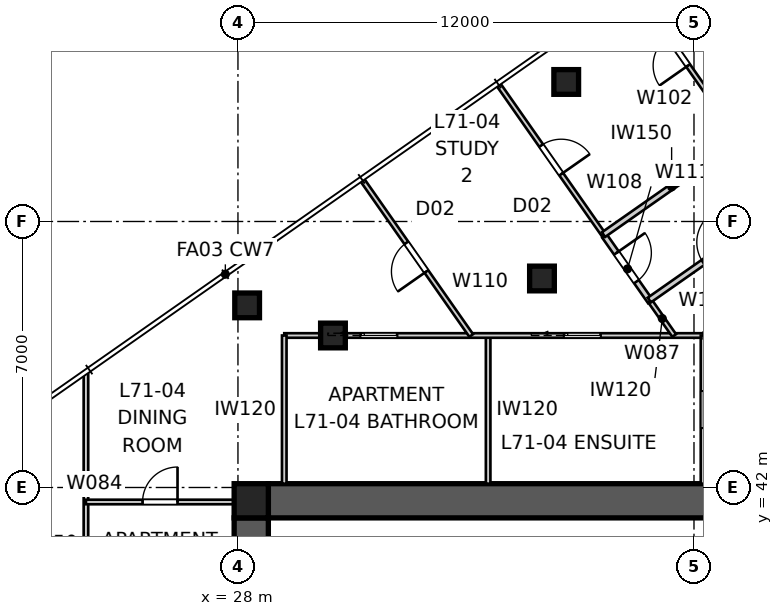
"""IFC4 building model, lengths in metres.
Left out: names, types, materials, properties, quantities, classifications, styles, units other than length and angle.
Written with IfcOpenShell. Run it as: python <this file> out.ifc"""

import sys

from ifc_helpers import new_model, si_unit, direction, frame, frame_2d, origin, origin_2d, place, context, subcontext, project, spatial, polyline, rectangle, outline, extrude, element, fill, save


model = new_model("IFC4")
c1 = context("Model", 3, precision=1e-05, world=origin(), true_north=direction((0.0, 1.0)))
c2 = subcontext(c1, "Body", "Model", "MODEL_VIEW")
j1 = project(units=[si_unit("LENGTHUNIT", "METRE"), si_unit("PLANEANGLEUNIT", "RADIAN")], contexts=[c1])
p1 = place(None, origin())
s1 = spatial("IfcSite", under=j1, at=p1, CompositionType="ELEMENT")
p2 = place(p1, origin())
s2 = spatial("IfcBuilding", under=s1, at=p2, CompositionType="ELEMENT")
p3 = place(p2, frame((0.0, 0.0, 257.4)))
s3 = spatial("IfcBuildingStorey", under=s2, at=p3, CompositionType="ELEMENT", Elevation=257.4)
p4 = place(p3, frame((28.8, 41.65, 0.0), z_axis=(0.0, 0.0, 1.0), x_axis=(1.0, 0.0, 0.0)))
e1 = element("IfcWall", 1, at=p4, inside=s3, PredefinedType="SHEAR", context=c2, shape_type="SweptSolid", body=[
    extrude(outline(polyline([(0.0, -0.45), (22.4, -0.45), (22.4, -0.025), (22.85, -0.025), (22.85, 0.025), (22.4, 0.025), (22.4, 0.45), (0.0, 0.45), (0.0, 0.025), (-0.45, 0.025), (-0.45, -0.025), (0.0, -0.025), (0.0, -0.45)])), origin(), (0.0, 0.0, 1.0), 3.4),
])
p5 = place(p3, frame((28.35, 41.2, 0.0), z_axis=(0.0, 0.0, 1.0), x_axis=(0.0, -1.0, 0.0)))
e2 = element("IfcWall", 2, at=p5, inside=s3, PredefinedType="SHEAR", context=c2, shape_type="SweptSolid", body=[
    extrude(outline(polyline([(0.0, -0.45), (22.4, -0.45), (22.4, -0.025), (22.85, -0.025), (22.85, 0.025), (22.4, 0.025), (22.4, 0.45), (0.0, 0.45), (0.0, 0.025), (-0.45, 0.025), (-0.45, -0.025), (0.0, -0.025), (0.0, -0.45)])), origin(), (0.0, 0.0, 1.0), 3.4),
])
p6 = place(p5, frame((11.14, 0.0, 0.0)))
e3 = element("IfcOpeningElement", 3, at=p6, cuts=e2, PredefinedType="OPENING", context=c2, shape_type="SweptSolid", body=[
    extrude(rectangle(XDim=1.02, YDim=2.4, at=frame_2d((0.51, 1.2))), frame((0.0, 0.46, 0.0), z_axis=(0.0, -1.0, 0.0), x_axis=(1.0, 0.0, 0.0)), (0.0, 0.0, 1.0), 0.92),
])
p7 = place(p3, frame((28.35, 41.65, 0.0), z_axis=(0.0, 0.0, 1.0), x_axis=(1.0, 0.0, 0.0)))
e4 = element("IfcColumn", 4, at=p7, inside=s3, PredefinedType="COLUMN", context=c2, shape_type="SweptSolid", body=[
    extrude(rectangle(XDim=0.9, YDim=0.9, at=origin_2d()), origin(), (0.0, 0.0, 1.0), 3.4),
])
for number, where, z_axis, x_axis in (
    (5, (36.638, 52.672, 0.0), (0.0, 0.0, 1.0), (1.0, 0.0, 0.0)),
    (6, (28.242, 46.793, 0.0), (0.0, 0.0, 1.0), (1.0, 0.0, 0.0)),
    (7, (36.0, 47.5, 0.0), (0.0, 0.0, 1.0), (1.0, 0.0, 0.0)),
    (8, (30.5, 46.0, 0.0), (0.0, 0.0, 1.0), (1.0, 0.0, 0.0)),
):
    element("IfcColumn", number, at=place(p3, frame(where, z_axis=z_axis, x_axis=x_axis)), inside=s3, PredefinedType="COLUMN", context=c2, shape_type="SweptSolid", body=[
        extrude(rectangle(XDim=0.65, YDim=0.65, at=origin_2d()), origin(), (0.0, 0.0, 1.0), 3.4),
    ])
p8 = place(p3, frame((24.0, 18.797, 0.0), z_axis=(0.0, 0.0, 1.0), x_axis=(0.0, 1.0, 0.0)))
e9 = element("IfcWall", 9, at=p8, inside=s3, PredefinedType="PARTITIONING", context=c2, shape_type="SweptSolid", body=[
    extrude(rectangle(XDim=26.198, YDim=0.12, at=frame_2d((13.099, 0.0))), origin(), (0.0, 0.0, 1.0), 2.55),
])
p9 = place(p8, frame((8.016, 0.0, 0.0)))
e10 = element("IfcOpeningElement", 10, at=p9, cuts=e9, PredefinedType="OPENING", context=c2, shape_type="SweptSolid", body=[
    extrude(rectangle(XDim=0.92, YDim=2.34, at=frame_2d((0.46, 1.17))), frame((0.0, 0.07, 0.0), z_axis=(0.0, -1.0, 0.0), x_axis=(1.0, 0.0, 0.0)), (0.0, 0.0, 1.0), 0.14),
])
p10 = place(p8, frame((16.292, 0.0, 0.0)))
e11 = element("IfcOpeningElement", 11, at=p10, cuts=e9, PredefinedType="OPENING", context=c2, shape_type="SweptSolid", body=[
    extrude(rectangle(XDim=0.92, YDim=2.34, at=frame_2d((0.46, 1.17))), frame((0.0, 0.07, 0.0), z_axis=(0.0, -1.0, 0.0), x_axis=(1.0, 0.0, 0.0)), (0.0, 0.0, 1.0), 0.14),
])
p11 = place(p3, frame((24.0, 41.619, 0.0), z_axis=(0.0, 0.0, 1.0), x_axis=(1.0, 0.0, 0.0)))
e12 = element("IfcWall", 12, at=p11, inside=s3, PredefinedType="PARTITIONING", context=c2, shape_type="SweptSolid", body=[
    extrude(rectangle(XDim=3.9, YDim=0.12, at=frame_2d((1.95, 0.0))), origin(), (0.0, 0.0, 1.0), 3.25),
])
p12 = place(p11, frame((1.49, 0.0, 0.0)))
e13 = element("IfcOpeningElement", 13, at=p12, cuts=e12, PredefinedType="OPENING", context=c2, shape_type="SweptSolid", body=[
    extrude(rectangle(XDim=0.92, YDim=2.1, at=frame_2d((0.46, 1.05))), frame((0.0, 0.07, 0.0), z_axis=(0.0, -1.0, 0.0), x_axis=(1.0, 0.0, 0.0)), (0.0, 0.0, 1.0), 0.14),
])
p13 = place(p3, frame((34.583, 46.0, 0.0), z_axis=(0.0, 0.0, 1.0), x_axis=(0.0, -1.0, 0.0)))
e14 = element("IfcWall", 14, at=p13, inside=s3, PredefinedType="PARTITIONING", context=c2, shape_type="SweptSolid", body=[
    extrude(rectangle(XDim=3.9, YDim=0.12, at=frame_2d((1.95, 0.0))), origin(), (0.0, 0.0, 1.0), 3.25),
])
p14 = place(p3, frame((29.219, 46.0, 0.0), z_axis=(0.0, 0.0, 1.0), x_axis=(1.0, 0.0, 0.0)))
e15 = element("IfcWall", 15, at=p14, inside=s3, PredefinedType="PARTITIONING", context=c2, shape_type="SweptSolid", body=[
    extrude(rectangle(XDim=11.034, YDim=0.12, at=frame_2d((5.517, 0.0))), origin(), (0.0, 0.0, 1.0), 2.55),
])
p15 = place(p14, frame((2.01, 0.0, 0.0)))
e16 = element("IfcOpeningElement", 16, at=p15, cuts=e15, PredefinedType="OPENING", context=c2, shape_type="SweptSolid", body=[
    extrude(rectangle(XDim=0.96, YDim=2.1, at=frame_2d((0.48, 1.05))), frame((0.0, 0.07, 0.0), z_axis=(0.0, -1.0, 0.0), x_axis=(1.0, 0.0, 0.0)), (0.0, 0.0, 1.0), 0.14),
])
p16 = place(p14, frame((7.363, 0.0, 0.0)))
e17 = element("IfcOpeningElement", 17, at=p16, cuts=e15, PredefinedType="OPENING", context=c2, shape_type="SweptSolid", body=[
    extrude(rectangle(XDim=0.96, YDim=2.1, at=frame_2d((0.48, 1.05))), frame((0.0, 0.07, 0.0), z_axis=(0.0, -1.0, 0.0), x_axis=(1.0, 0.0, 0.0)), (0.0, 0.0, 1.0), 0.14),
])
p17 = place(p3, frame((29.219, 42.1, 0.0), z_axis=(0.0, 0.0, 1.0), x_axis=(0.0, 1.0, 0.0)))
e18 = element("IfcWall", 18, at=p17, inside=s3, PredefinedType="PARTITIONING", context=c2, shape_type="SweptSolid", body=[
    extrude(rectangle(XDim=3.9, YDim=0.12, at=frame_2d((1.95, 0.0))), origin(), (0.0, 0.0, 1.0), 3.25),
])
p18 = place(p3, frame((40.253, 46.0, 0.0), z_axis=(0.0, 0.0, 1.0), x_axis=(0.0, -1.0, 0.0)))
e19 = element("IfcWall", 19, at=p18, inside=s3, PredefinedType="SOLIDWALL", context=c2, shape_type="SweptSolid", body=[
    extrude(rectangle(XDim=3.9, YDim=0.15, at=frame_2d((1.95, 0.0))), origin(), (0.0, 0.0, 1.0), 3.25),
])
p19 = place(p18, frame((1.47, 0.0, 0.0)))
e20 = element("IfcOpeningElement", 20, at=p19, cuts=e19, PredefinedType="OPENING", context=c2, shape_type="SweptSolid", body=[
    extrude(rectangle(XDim=0.96, YDim=2.1, at=frame_2d((0.48, 1.05))), frame((0.0, 0.085, 0.0), z_axis=(0.0, -1.0, 0.0), x_axis=(1.0, 0.0, 0.0)), (0.0, 0.0, 1.0), 0.17),
])
p20 = place(p3, frame((41.232, 51.123, 0.0), z_axis=(0.0, 0.0, 1.0), x_axis=(-0.573586984922, 0.819144657999, 0.0)))
e21 = element("IfcWall", 21, at=p20, inside=s3, PredefinedType="PARTITIONING", context=c2, shape_type="SweptSolid", body=[
    extrude(rectangle(XDim=4.864, YDim=0.12, at=frame_2d((2.432, 0.0))), origin(), (0.0, 0.0, 1.0), 3.25),
])
p21 = place(p20, frame((2.419, 0.0, 0.0)))
e22 = element("IfcOpeningElement", 22, at=p21, cuts=e21, PredefinedType="OPENING", context=c2, shape_type="SweptSolid", body=[
    extrude(rectangle(XDim=0.92, YDim=2.34, at=frame_2d((0.46, 1.17))), frame((0.0, 0.07, 0.0), z_axis=(0.0, -1.0, 0.0), x_axis=(1.0, 0.0, 0.0)), (0.0, 0.0, 1.0), 0.14),
])
p22 = place(p3, frame((34.859, 52.598, 0.0), z_axis=(0.0, 0.0, 1.0), x_axis=(0.573586984922, -0.819144657999, 0.0)))
e23 = element("IfcWall", 23, at=p22, inside=s3, PredefinedType="PARTITIONING", context=c2, shape_type="SweptSolid", body=[
    extrude(rectangle(XDim=4.864, YDim=0.12, at=frame_2d((2.432, 0.0))), origin(), (0.0, 0.0, 1.0), 3.25),
])
p23 = place(p22, frame((1.952, 0.0, 0.0)))
e24 = element("IfcOpeningElement", 24, at=p23, cuts=e23, PredefinedType="OPENING", context=c2, shape_type="SweptSolid", body=[
    extrude(rectangle(XDim=0.92, YDim=2.34, at=frame_2d((0.46, 1.17))), frame((0.0, 0.07, 0.0), z_axis=(0.0, -1.0, 0.0), x_axis=(1.0, 0.0, 0.0)), (0.0, 0.0, 1.0), 0.14),
])
p24 = place(p3, frame((38.854, 46.892, 0.0), z_axis=(0.0, 0.0, 1.0), x_axis=(0.57368792347, -0.81907396886, 0.0)))
e25 = element("IfcWall", 25, at=p24, inside=s3, PredefinedType="PARTITIONING", context=c2, shape_type="SweptSolid", body=[
    extrude(rectangle(XDim=1.089, YDim=0.12, at=frame_2d((0.545, 0.0))), origin(), (0.0, 0.0, 1.0), 3.25),
])
p25 = place(p3, frame((34.138, 46.0, 0.0), z_axis=(0.0, 0.0, 1.0), x_axis=(-0.57358708951, 0.819144584763, 0.0)))
e26 = element("IfcWall", 26, at=p25, inside=s3, PredefinedType="PARTITIONING", context=c2, shape_type="SweptSolid", body=[
    extrude(rectangle(XDim=4.991, YDim=0.12, at=frame_2d((2.496, 0.0))), origin(), (0.0, 0.0, 1.0), 3.25),
])
p26 = place(p25, frame((2.055, 0.0, 0.0)))
e27 = element("IfcOpeningElement", 27, at=p26, cuts=e26, PredefinedType="OPENING", context=c2, shape_type="SweptSolid", body=[
    extrude(rectangle(XDim=0.92, YDim=2.34, at=frame_2d((0.46, 1.17))), frame((0.0, 0.07, 0.0), z_axis=(0.0, -1.0, 0.0), x_axis=(1.0, 0.0, 0.0)), (0.0, 0.0, 1.0), 0.14),
])
p27 = place(p3, frame((37.648, 48.614, 0.0), z_axis=(0.0, 0.0, 1.0), x_axis=(0.573485736943, -0.819215545216, 0.0)))
e28 = element("IfcWall", 28, at=p27, inside=s3, PredefinedType="SOLIDWALL", context=c2, shape_type="SweptSolid", body=[
    extrude(rectangle(XDim=2.101, YDim=0.15, at=frame_2d((1.051, 0.0))), origin(), (0.0, 0.0, 1.0), 3.25),
])
p28 = place(p27, frame((0.541, 0.0, 0.0)))
e29 = element("IfcOpeningElement", 29, at=p28, cuts=e28, PredefinedType="OPENING", context=c2, shape_type="SweptSolid", body=[
    extrude(rectangle(XDim=0.92, YDim=2.34, at=frame_2d((0.46, 1.17))), frame((0.0, 0.085, 0.0), z_axis=(0.0, -1.0, 0.0), x_axis=(1.0, 0.0, 0.0)), (0.0, 0.0, 1.0), 0.17),
])
p29 = place(p3, frame((41.203, 51.164, 0.0), z_axis=(0.0, 0.0, 1.0), x_axis=(-0.81916112811, -0.573563463091, 0.0)))
e30 = element("IfcWall", 30, at=p29, inside=s3, PredefinedType="SOLIDWALL", context=c2, shape_type="SweptSolid", body=[
    extrude(rectangle(XDim=4.375, YDim=0.15, at=frame_2d((2.188, 0.0))), origin(), (0.0, 0.0, 1.0), 3.25),
])
p30 = place(p3, frame((38.825, 46.933, 0.0), z_axis=(0.0, 0.0, 1.0), x_axis=(0.81916112811, 0.573563463091, 0.0)))
e31 = element("IfcWall", 31, at=p30, inside=s3, PredefinedType="SOLIDWALL", context=c2, shape_type="SweptSolid", body=[
    extrude(rectangle(XDim=4.375, YDim=0.15, at=frame_2d((2.188, 0.0))), origin(), (0.0, 0.0, 1.0), 3.25),
])
p31 = place(p30, frame((1.728, 0.0, 0.0)))
e32 = element("IfcOpeningElement", 32, at=p31, cuts=e31, PredefinedType="OPENING", context=c2, shape_type="SweptSolid", body=[
    extrude(rectangle(XDim=0.92, YDim=2.34, at=frame_2d((0.46, 1.17))), frame((0.0, 0.085, 0.0), z_axis=(0.0, -1.0, 0.0), x_axis=(1.0, 0.0, 0.0)), (0.0, 0.0, 1.0), 0.17),
])
p32 = place(p3, frame((27.9, 41.619, 0.0), z_axis=(0.0, 0.0, 1.0), x_axis=(0.999397924003, 0.034695669724, 0.0)))
e33 = element("IfcWall", 33, at=p32, inside=s3, PredefinedType="PARTITIONING", context=c2, shape_type="SweptSolid", body=[
    extrude(rectangle(XDim=0.901, YDim=0.12, at=frame_2d((0.45, 0.0))), origin(), (0.0, 0.0, 1.0), 3.25),
])
p33 = place(p12, origin())
e34 = element("IfcDoor", 34, at=p33, inside=s3, OperationType="SINGLE_SWING_RIGHT", PredefinedType="DOOR", context=c2, shape_type="SweptSolid", body=[
    extrude(rectangle(XDim=0.92, YDim=2.1, at=frame_2d((0.46, 1.05))), frame((0.0, 0.025, 0.0), z_axis=(0.0, -1.0, 0.0), x_axis=(1.0, 0.0, 0.0)), (0.0, 0.0, 1.0), 0.05),
])
fill(e13, e34)
p34 = place(p26, origin())
e35 = element("IfcDoor", 35, at=p34, inside=s3, OperationType="SINGLE_SWING_LEFT", PredefinedType="DOOR", context=c2, shape_type="SweptSolid", body=[
    extrude(rectangle(XDim=0.92, YDim=2.34, at=frame_2d((0.46, 1.17))), frame((0.0, 0.025, 0.0), z_axis=(0.0, -1.0, 0.0), x_axis=(1.0, 0.0, 0.0)), (0.0, 0.0, 1.0), 0.05),
])
fill(e27, e35)
p35 = place(p15, origin())
e36 = element("IfcDoor", 36, at=p35, inside=s3, OperationType="SLIDING_TO_LEFT", PredefinedType="DOOR", context=c2, shape_type="SweptSolid", body=[
    extrude(rectangle(XDim=0.96, YDim=2.1, at=frame_2d((0.48, 1.05))), frame((0.0, 0.025, 0.0), z_axis=(0.0, -1.0, 0.0), x_axis=(1.0, 0.0, 0.0)), (0.0, 0.0, 1.0), 0.05),
])
fill(e16, e36)
p36 = place(p16, origin())
e37 = element("IfcDoor", 37, at=p36, inside=s3, OperationType="SLIDING_TO_LEFT", PredefinedType="DOOR", context=c2, shape_type="SweptSolid", body=[
    extrude(rectangle(XDim=0.96, YDim=2.1, at=frame_2d((0.48, 1.05))), frame((0.0, 0.025, 0.0), z_axis=(0.0, -1.0, 0.0), x_axis=(1.0, 0.0, 0.0)), (0.0, 0.0, 1.0), 0.05),
])
fill(e17, e37)
p37 = place(p23, origin())
e38 = element("IfcDoor", 38, at=p37, inside=s3, OperationType="SINGLE_SWING_RIGHT", PredefinedType="DOOR", context=c2, shape_type="SweptSolid", body=[
    extrude(rectangle(XDim=0.92, YDim=2.34, at=frame_2d((0.46, 1.17))), frame((0.0, 0.025, 0.0), z_axis=(0.0, -1.0, 0.0), x_axis=(1.0, 0.0, 0.0)), (0.0, 0.0, 1.0), 0.05),
])
fill(e24, e38)
p38 = place(p28, origin())
e39 = element("IfcDoor", 39, at=p38, inside=s3, OperationType="SINGLE_SWING_LEFT", PredefinedType="DOOR", context=c2, shape_type="SweptSolid", body=[
    extrude(rectangle(XDim=0.92, YDim=2.34, at=frame_2d((0.46, 1.17))), frame((0.0, 0.025, 0.0), z_axis=(0.0, -1.0, 0.0), x_axis=(1.0, 0.0, 0.0)), (0.0, 0.0, 1.0), 0.05),
])
fill(e29, e39)
p39 = place(p19, origin())
e40 = element("IfcDoor", 40, at=p39, inside=s3, OperationType="SLIDING_TO_LEFT", PredefinedType="DOOR", context=c2, shape_type="SweptSolid", body=[
    extrude(rectangle(XDim=0.96, YDim=2.1, at=frame_2d((0.48, 1.05))), frame((0.0, 0.025, 0.0), z_axis=(0.0, -1.0, 0.0), x_axis=(1.0, 0.0, 0.0)), (0.0, 0.0, 1.0), 0.05),
])
fill(e20, e40)
p40 = place(p21, origin())
e41 = element("IfcDoor", 41, at=p40, inside=s3, OperationType="SINGLE_SWING_LEFT", PredefinedType="DOOR", context=c2, shape_type="SweptSolid", body=[
    extrude(rectangle(XDim=0.92, YDim=2.34, at=frame_2d((0.46, 1.17))), frame((0.0, 0.025, 0.0), z_axis=(0.0, -1.0, 0.0), x_axis=(1.0, 0.0, 0.0)), (0.0, 0.0, 1.0), 0.05),
])
fill(e22, e41)
p41 = place(p31, origin())
e42 = element("IfcDoor", 42, at=p41, inside=s3, OperationType="SINGLE_SWING_RIGHT", PredefinedType="DOOR", context=c2, shape_type="SweptSolid", body=[
    extrude(rectangle(XDim=0.92, YDim=2.34, at=frame_2d((0.46, 1.17))), frame((0.0, 0.025, 0.0), z_axis=(0.0, -1.0, 0.0), x_axis=(1.0, 0.0, 0.0)), (0.0, 0.0, 1.0), 0.05),
])
fill(e32, e42)
save(model, sys.argv[1])
